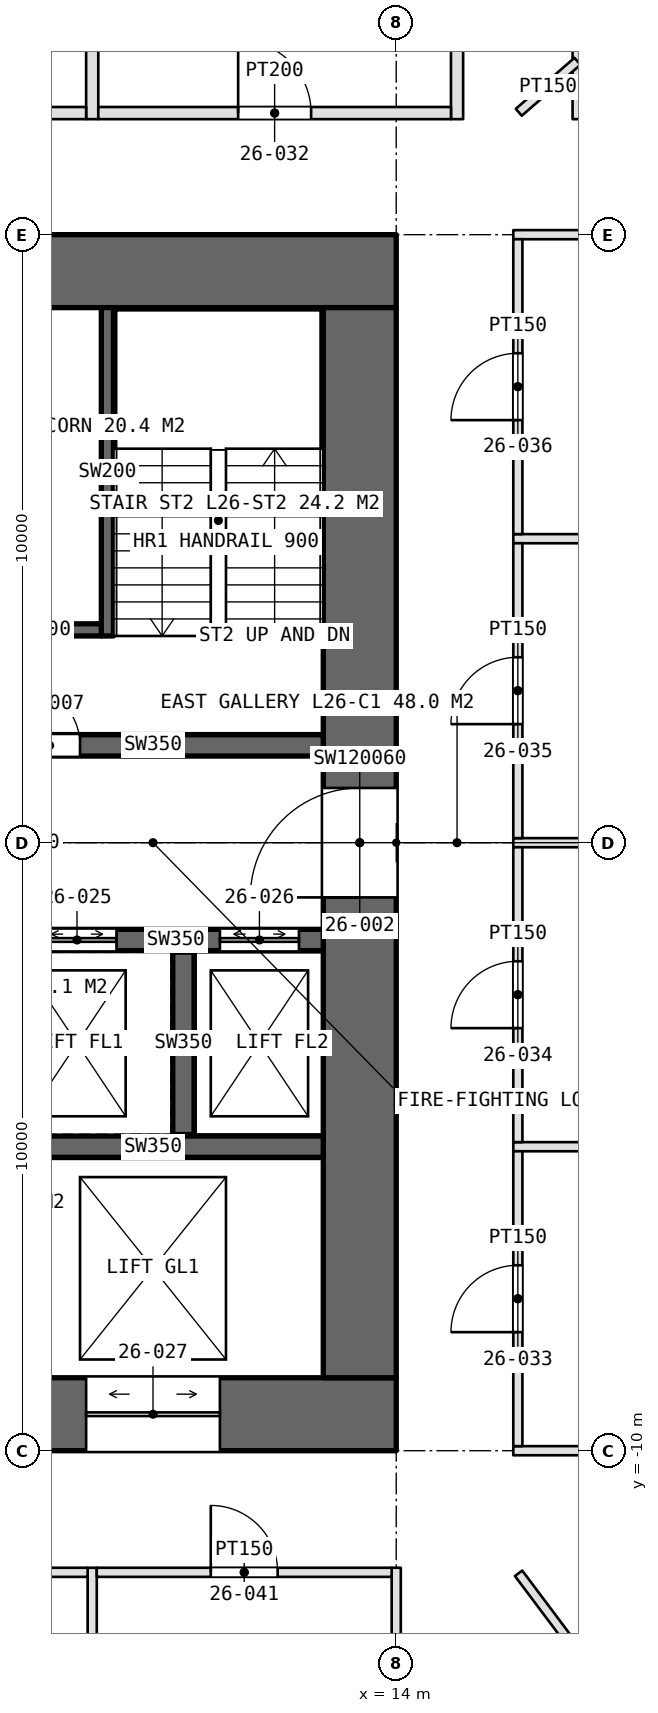
"""IFC4 building model, lengths in metres.
Left out: names, types, materials, properties, quantities, classifications, styles, units other than length and angle.
Written with IfcOpenShell. Run it as: python <this file> out.ifc"""

import sys

from ifc_helpers import new_model, si_unit, direction, frame, frame_2d, origin, place, context, subcontext, project, spatial, rectangle, extrude, element, fill, save


model = new_model("IFC4")
c1 = context("Model", 3, precision=1e-05, world=origin(), true_north=direction((0.0, 1.0)))
c2 = subcontext(c1, "Body", "Model", "MODEL_VIEW")
j1 = project(units=[si_unit("LENGTHUNIT", "METRE"), si_unit("PLANEANGLEUNIT", "RADIAN")], contexts=[c1])
p1 = place(None, origin())
s1 = spatial("IfcSite", under=j1, at=p1, CompositionType="ELEMENT")
p2 = place(p1, origin())
s2 = spatial("IfcBuilding", under=s1, at=p2, CompositionType="ELEMENT")
p3 = place(p2, frame((0.0, 0.0, 126.0)))
s3 = spatial("IfcBuildingStorey", under=s2, at=p3, CompositionType="ELEMENT", Elevation=126.0)
p4 = place(p3, frame((-14.0, -9.4, 0.0), z_axis=(0.0, 0.0, 1.0), x_axis=(1.0, 0.0, 0.0)))
e1 = element("IfcWall", 1, at=p4, inside=s3, PredefinedType="SHEAR", context=c2, shape_type="SweptSolid", body=[
    extrude(rectangle(XDim=28.0, YDim=1.2, at=frame_2d((14.0, 0.0))), origin(), (0.0, 0.0, 1.0), 4.2),
])
p5 = place(p4, frame((13.1, 0.0, 0.0)))
e2 = element("IfcOpeningElement", 2, at=p5, cuts=e1, PredefinedType="OPENING", context=c2, shape_type="SweptSolid", body=[
    extrude(rectangle(XDim=1.8, YDim=2.4, at=frame_2d((0.9, 1.2))), frame((0.0, 0.61, 0.0), z_axis=(0.0, -1.0, 0.0), x_axis=(1.0, 0.0, 0.0)), (0.0, 0.0, 1.0), 1.22),
])
p6 = place(p4, frame((22.9, 0.0, 0.0)))
e3 = element("IfcOpeningElement", 3, at=p6, cuts=e1, PredefinedType="OPENING", context=c2, shape_type="SweptSolid", body=[
    extrude(rectangle(XDim=2.2, YDim=2.7, at=frame_2d((1.1, 1.35))), frame((0.0, 0.61, 0.0), z_axis=(0.0, -1.0, 0.0), x_axis=(1.0, 0.0, 0.0)), (0.0, 0.0, 1.0), 1.22),
])
p7 = place(p3, frame((14.0, 9.4, 0.0), z_axis=(0.0, 0.0, 1.0), x_axis=(-1.0, 0.0, 0.0)))
e4 = element("IfcWall", 4, at=p7, inside=s3, PredefinedType="SHEAR", context=c2, shape_type="SweptSolid", body=[
    extrude(rectangle(XDim=28.0, YDim=1.2, at=frame_2d((14.0, 0.0))), origin(), (0.0, 0.0, 1.0), 4.2),
])
p8 = place(p7, frame((24.0, 0.0, 0.0)))
e5 = element("IfcOpeningElement", 5, at=p8, cuts=e4, PredefinedType="OPENING", context=c2, shape_type="SweptSolid", body=[
    extrude(rectangle(XDim=1.0, YDim=2.4, at=frame_2d((0.5, 1.2))), frame((0.0, 0.61, 0.0), z_axis=(0.0, -1.0, 0.0), x_axis=(1.0, 0.0, 0.0)), (0.0, 0.0, 1.0), 1.22),
])
p9 = place(p7, frame((13.1, 0.0, 0.0)))
e6 = element("IfcOpeningElement", 6, at=p9, cuts=e4, PredefinedType="OPENING", context=c2, shape_type="SweptSolid", body=[
    extrude(rectangle(XDim=1.8, YDim=2.4, at=frame_2d((0.9, 1.2))), frame((0.0, 0.61, 0.0), z_axis=(0.0, -1.0, 0.0), x_axis=(1.0, 0.0, 0.0)), (0.0, 0.0, 1.0), 1.22),
])
p10 = place(p3, frame((13.4, -8.8, 0.0), z_axis=(0.0, 0.0, 1.0), x_axis=(0.0, 1.0, 0.0)))
e7 = element("IfcWall", 7, at=p10, inside=s3, PredefinedType="SHEAR", context=c2, shape_type="SweptSolid", body=[
    extrude(rectangle(XDim=17.6, YDim=1.2, at=frame_2d((8.8, 0.0))), origin(), (0.0, 0.0, 1.0), 4.2),
])
p11 = place(p10, frame((7.9, 0.0, 0.0)))
e8 = element("IfcOpeningElement", 8, at=p11, cuts=e7, PredefinedType="OPENING", context=c2, shape_type="SweptSolid", body=[
    extrude(rectangle(XDim=1.8, YDim=2.4, at=frame_2d((0.9, 1.2))), frame((0.0, 0.61, 0.0), z_axis=(0.0, -1.0, 0.0), x_axis=(1.0, 0.0, 0.0)), (0.0, 0.0, 1.0), 1.22),
])
p12 = place(p3, frame((7.2, 1.6, 0.0), z_axis=(0.0, 0.0, 1.0), x_axis=(1.0, 0.0, 0.0)))
e9 = element("IfcWall", 9, at=p12, inside=s3, PredefinedType="SHEAR", context=c2, shape_type="SweptSolid", body=[
    extrude(rectangle(XDim=5.6, YDim=0.35, at=frame_2d((2.8, 0.0))), origin(), (0.0, 0.0, 1.0), 4.2),
])
p13 = place(p12, frame((0.6, 0.0, 0.0)))
e10 = element("IfcOpeningElement", 10, at=p13, cuts=e9, PredefinedType="OPENING", context=c2, shape_type="SweptSolid", body=[
    extrude(rectangle(XDim=1.0, YDim=2.4, at=frame_2d((0.5, 1.2))), frame((0.0, 0.185, 0.0), z_axis=(0.0, -1.0, 0.0), x_axis=(1.0, 0.0, 0.0)), (0.0, 0.0, 1.0), 0.37),
])
p14 = place(p3, frame((7.2, -1.6, 0.0), z_axis=(0.0, 0.0, 1.0), x_axis=(1.0, 0.0, 0.0)))
e11 = element("IfcWall", 11, at=p14, inside=s3, PredefinedType="SHEAR", context=c2, shape_type="SweptSolid", body=[
    extrude(rectangle(XDim=5.6, YDim=0.35, at=frame_2d((2.8, 0.0))), origin(), (0.0, 0.0, 1.0), 4.2),
])
p15 = place(p14, frame((0.9, 0.0, 0.0)))
e12 = element("IfcOpeningElement", 12, at=p15, cuts=e11, PredefinedType="OPENING", context=c2, shape_type="SweptSolid", body=[
    extrude(rectangle(XDim=1.3, YDim=2.4, at=frame_2d((0.65, 1.2))), frame((0.0, 0.185, 0.0), z_axis=(0.0, -1.0, 0.0), x_axis=(1.0, 0.0, 0.0)), (0.0, 0.0, 1.0), 0.37),
])
p16 = place(p14, frame((3.9, 0.0, 0.0)))
e13 = element("IfcOpeningElement", 13, at=p16, cuts=e11, PredefinedType="OPENING", context=c2, shape_type="SweptSolid", body=[
    extrude(rectangle(XDim=1.3, YDim=2.4, at=frame_2d((0.65, 1.2))), frame((0.0, 0.185, 0.0), z_axis=(0.0, -1.0, 0.0), x_axis=(1.0, 0.0, 0.0)), (0.0, 0.0, 1.0), 0.37),
])
p17 = place(p3, frame((10.5, -4.8, 0.0), z_axis=(0.0, 0.0, 1.0), x_axis=(0.0, 1.0, 0.0)))
e14 = element("IfcWall", 14, at=p17, inside=s3, PredefinedType="SHEAR", context=c2, shape_type="SweptSolid", body=[
    extrude(rectangle(XDim=3.0, YDim=0.35, at=frame_2d((1.5, 0.0))), origin(), (0.0, 0.0, 1.0), 4.2),
])
p18 = place(p3, frame((7.2, -5.0, 0.0), z_axis=(0.0, 0.0, 1.0), x_axis=(1.0, 0.0, 0.0)))
e15 = element("IfcWall", 15, at=p18, inside=s3, PredefinedType="SHEAR", context=c2, shape_type="SweptSolid", body=[
    extrude(rectangle(XDim=5.6, YDim=0.35, at=frame_2d((2.8, 0.0))), origin(), (0.0, 0.0, 1.0), 4.2),
])
p19 = place(p3, frame((9.25, 3.4, 0.0), z_axis=(0.0, 0.0, 1.0), x_axis=(0.0, 1.0, 0.0)))
e16 = element("IfcWall", 16, at=p19, inside=s3, PredefinedType="SOLIDWALL", context=c2, shape_type="SweptSolid", body=[
    extrude(rectangle(XDim=5.4, YDim=0.2, at=frame_2d((2.7, 0.0))), origin(), (0.0, 0.0, 1.0), 4.2),
])
p20 = place(p3, frame((9.15, 3.5, 0.0), z_axis=(0.0, 0.0, 1.0), x_axis=(-1.0, 0.0, 0.0)))
e17 = element("IfcWall", 17, at=p20, inside=s3, PredefinedType="SOLIDWALL", context=c2, shape_type="SweptSolid", body=[
    extrude(rectangle(XDim=1.95, YDim=0.2, at=frame_2d((0.975, 0.0))), origin(), (0.0, 0.0, 1.0), 4.2),
])
for number, where, z_axis, x_axis in (
    (18, (9.0, 11.9, 0.0), (0.0, 0.0, 1.0), (0.0, 1.0, 0.0)),
    (19, (15.0, 11.9, 0.0), (0.0, 0.0, 1.0), (0.0, 1.0, 0.0)),
):
    element("IfcWall", number, at=place(p3, frame(where, z_axis=z_axis, x_axis=x_axis)), inside=s3, PredefinedType="PARTITIONING", context=c2, shape_type="SweptSolid", body=[
        extrude(rectangle(XDim=7.2, YDim=0.2, at=frame_2d((3.6, 0.0))), origin(), (0.0, 0.0, 1.0), 3.0),
    ])
p21 = place(p3, frame((3.1, 12.0, 0.0), z_axis=(0.0, 0.0, 1.0), x_axis=(1.0, 0.0, 0.0)))
e20 = element("IfcWall", 20, at=p21, inside=s3, PredefinedType="PARTITIONING", context=c2, shape_type="SweptSolid", body=[
    extrude(rectangle(XDim=5.8, YDim=0.2, at=frame_2d((2.9, 0.0))), origin(), (0.0, 0.0, 1.0), 3.0),
])
p22 = place(p21, frame((2.3, 0.0, 0.0)))
e21 = element("IfcOpeningElement", 21, at=p22, cuts=e20, PredefinedType="OPENING", context=c2, shape_type="SweptSolid", body=[
    extrude(rectangle(XDim=1.2, YDim=2.4, at=frame_2d((0.6, 1.2))), frame((0.0, 0.11, 0.0), z_axis=(0.0, -1.0, 0.0), x_axis=(1.0, 0.0, 0.0)), (0.0, 0.0, 1.0), 0.22),
])
p23 = place(p3, frame((9.1, 12.0, 0.0), z_axis=(0.0, 0.0, 1.0), x_axis=(1.0, 0.0, 0.0)))
e22 = element("IfcWall", 22, at=p23, inside=s3, PredefinedType="PARTITIONING", context=c2, shape_type="SweptSolid", body=[
    extrude(rectangle(XDim=5.8, YDim=0.2, at=frame_2d((2.9, 0.0))), origin(), (0.0, 0.0, 1.0), 3.0),
])
p24 = place(p23, frame((2.3, 0.0, 0.0)))
e23 = element("IfcOpeningElement", 23, at=p24, cuts=e22, PredefinedType="OPENING", context=c2, shape_type="SweptSolid", body=[
    extrude(rectangle(XDim=1.2, YDim=2.4, at=frame_2d((0.6, 1.2))), frame((0.0, 0.11, 0.0), z_axis=(0.0, -1.0, 0.0), x_axis=(1.0, 0.0, 0.0)), (0.0, 0.0, 1.0), 0.22),
])
for number, where, z_axis, x_axis in (
    (24, (15.925, -10.0, 0.0), (0.0, 0.0, 1.0), (1.0, 0.0, 0.0)),
    (25, (15.925, -5.0, 0.0), (0.0, 0.0, 1.0), (1.0, 0.0, 0.0)),
    (26, (15.925, 0.0, 0.0), (0.0, 0.0, 1.0), (1.0, 0.0, 0.0)),
    (27, (15.925, 5.0, 0.0), (0.0, 0.0, 1.0), (1.0, 0.0, 0.0)),
    (28, (15.925, 10.0, 0.0), (0.0, 0.0, 1.0), (1.0, 0.0, 0.0)),
):
    element("IfcWall", number, at=place(p3, frame(where, z_axis=z_axis, x_axis=x_axis)), inside=s3, PredefinedType="PARTITIONING", context=c2, shape_type="SweptSolid", body=[
        extrude(rectangle(XDim=6.15, YDim=0.15, at=frame_2d((3.075, 0.0))), origin(), (0.0, 0.0, 1.0), 3.0),
    ])
p25 = place(p3, frame((16.0, -9.925, 0.0), z_axis=(0.0, 0.0, 1.0), x_axis=(0.0, 1.0, 0.0)))
e29 = element("IfcWall", 29, at=p25, inside=s3, PredefinedType="PARTITIONING", context=c2, shape_type="SweptSolid", body=[
    extrude(rectangle(XDim=4.85, YDim=0.15, at=frame_2d((2.425, 0.0))), origin(), (0.0, 0.0, 1.0), 3.0),
])
p26 = place(p25, frame((1.875, 0.0, 0.0)))
e30 = element("IfcOpeningElement", 30, at=p26, cuts=e29, PredefinedType="OPENING", context=c2, shape_type="SweptSolid", body=[
    extrude(rectangle(XDim=1.1, YDim=2.3, at=frame_2d((0.55, 1.15))), frame((0.0, 0.085, 0.0), z_axis=(0.0, -1.0, 0.0), x_axis=(1.0, 0.0, 0.0)), (0.0, 0.0, 1.0), 0.17),
])
p27 = place(p3, frame((16.0, -4.925, 0.0), z_axis=(0.0, 0.0, 1.0), x_axis=(0.0, 1.0, 0.0)))
e31 = element("IfcWall", 31, at=p27, inside=s3, PredefinedType="PARTITIONING", context=c2, shape_type="SweptSolid", body=[
    extrude(rectangle(XDim=4.85, YDim=0.15, at=frame_2d((2.425, 0.0))), origin(), (0.0, 0.0, 1.0), 3.0),
])
p28 = place(p27, frame((1.875, 0.0, 0.0)))
e32 = element("IfcOpeningElement", 32, at=p28, cuts=e31, PredefinedType="OPENING", context=c2, shape_type="SweptSolid", body=[
    extrude(rectangle(XDim=1.1, YDim=2.3, at=frame_2d((0.55, 1.15))), frame((0.0, 0.085, 0.0), z_axis=(0.0, -1.0, 0.0), x_axis=(1.0, 0.0, 0.0)), (0.0, 0.0, 1.0), 0.17),
])
p29 = place(p3, frame((16.0, 0.075, 0.0), z_axis=(0.0, 0.0, 1.0), x_axis=(0.0, 1.0, 0.0)))
e33 = element("IfcWall", 33, at=p29, inside=s3, PredefinedType="PARTITIONING", context=c2, shape_type="SweptSolid", body=[
    extrude(rectangle(XDim=4.85, YDim=0.15, at=frame_2d((2.425, 0.0))), origin(), (0.0, 0.0, 1.0), 3.0),
])
p30 = place(p29, frame((1.875, 0.0, 0.0)))
e34 = element("IfcOpeningElement", 34, at=p30, cuts=e33, PredefinedType="OPENING", context=c2, shape_type="SweptSolid", body=[
    extrude(rectangle(XDim=1.1, YDim=2.3, at=frame_2d((0.55, 1.15))), frame((0.0, 0.085, 0.0), z_axis=(0.0, -1.0, 0.0), x_axis=(1.0, 0.0, 0.0)), (0.0, 0.0, 1.0), 0.17),
])
p31 = place(p3, frame((16.0, 5.075, 0.0), z_axis=(0.0, 0.0, 1.0), x_axis=(0.0, 1.0, 0.0)))
e35 = element("IfcWall", 35, at=p31, inside=s3, PredefinedType="PARTITIONING", context=c2, shape_type="SweptSolid", body=[
    extrude(rectangle(XDim=4.85, YDim=0.15, at=frame_2d((2.425, 0.0))), origin(), (0.0, 0.0, 1.0), 3.0),
])
p32 = place(p31, frame((1.875, 0.0, 0.0)))
e36 = element("IfcOpeningElement", 36, at=p32, cuts=e35, PredefinedType="OPENING", context=c2, shape_type="SweptSolid", body=[
    extrude(rectangle(XDim=1.1, YDim=2.3, at=frame_2d((0.55, 1.15))), frame((0.0, 0.085, 0.0), z_axis=(0.0, -1.0, 0.0), x_axis=(1.0, 0.0, 0.0)), (0.0, 0.0, 1.0), 0.17),
])
for number, where, z_axis, x_axis in (
    (37, (9.0, -11.925, 0.0), (0.0, 0.0, 1.0), (0.0, -1.0, 0.0)),
    (38, (14.0, -11.925, 0.0), (0.0, 0.0, 1.0), (0.0, -1.0, 0.0)),
):
    element("IfcWall", number, at=place(p3, frame(where, z_axis=z_axis, x_axis=x_axis)), inside=s3, PredefinedType="PARTITIONING", context=c2, shape_type="SweptSolid", body=[
        extrude(rectangle(XDim=6.15, YDim=0.15, at=frame_2d((3.075, 0.0))), origin(), (0.0, 0.0, 1.0), 3.0),
    ])
p33 = place(p3, frame((4.1, -12.0, 0.0), z_axis=(0.0, 0.0, 1.0), x_axis=(1.0, 0.0, 0.0)))
e39 = element("IfcWall", 39, at=p33, inside=s3, PredefinedType="PARTITIONING", context=c2, shape_type="SweptSolid", body=[
    extrude(rectangle(XDim=4.825, YDim=0.15, at=frame_2d((2.413, 0.0))), origin(), (0.0, 0.0, 1.0), 3.0),
])
p34 = place(p33, frame((1.863, 0.0, 0.0)))
e40 = element("IfcOpeningElement", 40, at=p34, cuts=e39, PredefinedType="OPENING", context=c2, shape_type="SweptSolid", body=[
    extrude(rectangle(XDim=1.1, YDim=2.3, at=frame_2d((0.55, 1.15))), frame((0.0, 0.085, 0.0), z_axis=(0.0, -1.0, 0.0), x_axis=(1.0, 0.0, 0.0)), (0.0, 0.0, 1.0), 0.17),
])
p35 = place(p3, frame((9.075, -12.0, 0.0), z_axis=(0.0, 0.0, 1.0), x_axis=(1.0, 0.0, 0.0)))
e41 = element("IfcWall", 41, at=p35, inside=s3, PredefinedType="PARTITIONING", context=c2, shape_type="SweptSolid", body=[
    extrude(rectangle(XDim=4.85, YDim=0.15, at=frame_2d((2.425, 0.0))), origin(), (0.0, 0.0, 1.0), 3.0),
])
p36 = place(p35, frame((1.875, 0.0, 0.0)))
e42 = element("IfcOpeningElement", 42, at=p36, cuts=e41, PredefinedType="OPENING", context=c2, shape_type="SweptSolid", body=[
    extrude(rectangle(XDim=1.1, YDim=2.3, at=frame_2d((0.55, 1.15))), frame((0.0, 0.085, 0.0), z_axis=(0.0, -1.0, 0.0), x_axis=(1.0, 0.0, 0.0)), (0.0, 0.0, 1.0), 0.17),
])
p37 = place(p3, frame((17.0, 11.9, 0.0), z_axis=(0.0, 0.0, 1.0), x_axis=(0.0, 1.0, 0.0)))
e43 = element("IfcWall", 43, at=p37, inside=s3, PredefinedType="PARTITIONING", context=c2, shape_type="SweptSolid", body=[
    extrude(rectangle(XDim=5.2, YDim=0.2, at=frame_2d((2.6, 0.0))), origin(), (0.0, 0.0, 1.0), 3.0),
])
p38 = place(p3, frame((16.012, -12.016, 0.0), z_axis=(0.0, 0.0, 1.0), x_axis=(0.600059749679, -0.799955184254, 0.0)))
e44 = element("IfcWall", 44, at=p38, inside=s3, PredefinedType="PARTITIONING", context=c2, shape_type="SweptSolid", body=[
    extrude(rectangle(XDim=7.191, YDim=0.15, at=frame_2d((3.596, 0.0))), origin(), (0.0, 0.0, 1.0), 3.0),
])
p39 = place(p3, frame((16.015, 12.013, 0.0), z_axis=(0.0, 0.0, 1.0), x_axis=(0.754654851831, 0.656121981501, 0.0)))
e45 = element("IfcWall", 45, at=p39, inside=s3, PredefinedType="PARTITIONING", context=c2, shape_type="SweptSolid", body=[
    extrude(rectangle(XDim=1.279, YDim=0.15, at=frame_2d((0.639, 0.0))), origin(), (0.0, 0.0, 1.0), 3.0),
])
p40 = place(p11, origin())
e46 = element("IfcDoor", 46, at=p40, inside=s3, OperationType="DOUBLE_DOOR_SINGLE_SWING", PredefinedType="DOOR", context=c2, shape_type="SweptSolid", body=[
    extrude(rectangle(XDim=1.8, YDim=2.4, at=frame_2d((0.9, 1.2))), frame((0.0, 0.025, 0.0), z_axis=(0.0, -1.0, 0.0), x_axis=(1.0, 0.0, 0.0)), (0.0, 0.0, 1.0), 0.05),
])
fill(e8, e46)
p41 = place(p13, origin())
e47 = element("IfcDoor", 47, at=p41, inside=s3, OperationType="SINGLE_SWING_LEFT", PredefinedType="DOOR", context=c2, shape_type="SweptSolid", body=[
    extrude(rectangle(XDim=1.0, YDim=2.4, at=frame_2d((0.5, 1.2))), frame((0.0, 0.025, 0.0), z_axis=(0.0, -1.0, 0.0), x_axis=(1.0, 0.0, 0.0)), (0.0, 0.0, 1.0), 0.05),
])
fill(e10, e47)
p42 = place(p15, origin())
e48 = element("IfcDoor", 48, at=p42, inside=s3, OperationType="DOUBLE_DOOR_SLIDING", PredefinedType="DOOR", context=c2, shape_type="SweptSolid", body=[
    extrude(rectangle(XDim=1.3, YDim=2.4, at=frame_2d((0.65, 1.2))), frame((0.0, 0.025, 0.0), z_axis=(0.0, -1.0, 0.0), x_axis=(1.0, 0.0, 0.0)), (0.0, 0.0, 1.0), 0.05),
])
fill(e12, e48)
p43 = place(p16, origin())
e49 = element("IfcDoor", 49, at=p43, inside=s3, OperationType="DOUBLE_DOOR_SLIDING", PredefinedType="DOOR", context=c2, shape_type="SweptSolid", body=[
    extrude(rectangle(XDim=1.3, YDim=2.4, at=frame_2d((0.65, 1.2))), frame((0.0, 0.025, 0.0), z_axis=(0.0, -1.0, 0.0), x_axis=(1.0, 0.0, 0.0)), (0.0, 0.0, 1.0), 0.05),
])
fill(e13, e49)
p44 = place(p6, origin())
e50 = element("IfcDoor", 50, at=p44, inside=s3, OperationType="DOUBLE_DOOR_SLIDING", PredefinedType="DOOR", context=c2, shape_type="SweptSolid", body=[
    extrude(rectangle(XDim=2.2, YDim=2.7, at=frame_2d((1.1, 1.35))), frame((0.0, 0.025, 0.0), z_axis=(0.0, -1.0, 0.0), x_axis=(1.0, 0.0, 0.0)), (0.0, 0.0, 1.0), 0.05),
])
fill(e3, e50)
p45 = place(p24, origin())
e51 = element("IfcDoor", 51, at=p45, inside=s3, OperationType="SINGLE_SWING_LEFT", PredefinedType="DOOR", context=c2, shape_type="SweptSolid", body=[
    extrude(rectangle(XDim=1.2, YDim=2.4, at=frame_2d((0.6, 1.2))), frame((0.0, 0.025, 0.0), z_axis=(0.0, -1.0, 0.0), x_axis=(1.0, 0.0, 0.0)), (0.0, 0.0, 1.0), 0.05),
])
fill(e23, e51)
p46 = place(p26, origin())
e52 = element("IfcDoor", 52, at=p46, inside=s3, OperationType="SINGLE_SWING_LEFT", PredefinedType="DOOR", context=c2, shape_type="SweptSolid", body=[
    extrude(rectangle(XDim=1.1, YDim=2.3, at=frame_2d((0.55, 1.15))), frame((0.0, 0.025, 0.0), z_axis=(0.0, -1.0, 0.0), x_axis=(1.0, 0.0, 0.0)), (0.0, 0.0, 1.0), 0.05),
])
fill(e30, e52)
p47 = place(p28, origin())
e53 = element("IfcDoor", 53, at=p47, inside=s3, OperationType="SINGLE_SWING_LEFT", PredefinedType="DOOR", context=c2, shape_type="SweptSolid", body=[
    extrude(rectangle(XDim=1.1, YDim=2.3, at=frame_2d((0.55, 1.15))), frame((0.0, 0.025, 0.0), z_axis=(0.0, -1.0, 0.0), x_axis=(1.0, 0.0, 0.0)), (0.0, 0.0, 1.0), 0.05),
])
fill(e32, e53)
p48 = place(p30, origin())
e54 = element("IfcDoor", 54, at=p48, inside=s3, OperationType="SINGLE_SWING_LEFT", PredefinedType="DOOR", context=c2, shape_type="SweptSolid", body=[
    extrude(rectangle(XDim=1.1, YDim=2.3, at=frame_2d((0.55, 1.15))), frame((0.0, 0.025, 0.0), z_axis=(0.0, -1.0, 0.0), x_axis=(1.0, 0.0, 0.0)), (0.0, 0.0, 1.0), 0.05),
])
fill(e34, e54)
p49 = place(p32, origin())
e55 = element("IfcDoor", 55, at=p49, inside=s3, OperationType="SINGLE_SWING_LEFT", PredefinedType="DOOR", context=c2, shape_type="SweptSolid", body=[
    extrude(rectangle(XDim=1.1, YDim=2.3, at=frame_2d((0.55, 1.15))), frame((0.0, 0.025, 0.0), z_axis=(0.0, -1.0, 0.0), x_axis=(1.0, 0.0, 0.0)), (0.0, 0.0, 1.0), 0.05),
])
fill(e36, e55)
p50 = place(p36, origin())
e56 = element("IfcDoor", 56, at=p50, inside=s3, OperationType="SINGLE_SWING_LEFT", PredefinedType="DOOR", context=c2, shape_type="SweptSolid", body=[
    extrude(rectangle(XDim=1.1, YDim=2.3, at=frame_2d((0.55, 1.15))), frame((0.0, 0.025, 0.0), z_axis=(0.0, -1.0, 0.0), x_axis=(1.0, 0.0, 0.0)), (0.0, 0.0, 1.0), 0.05),
])
fill(e42, e56)
save(model, sys.argv[1])
